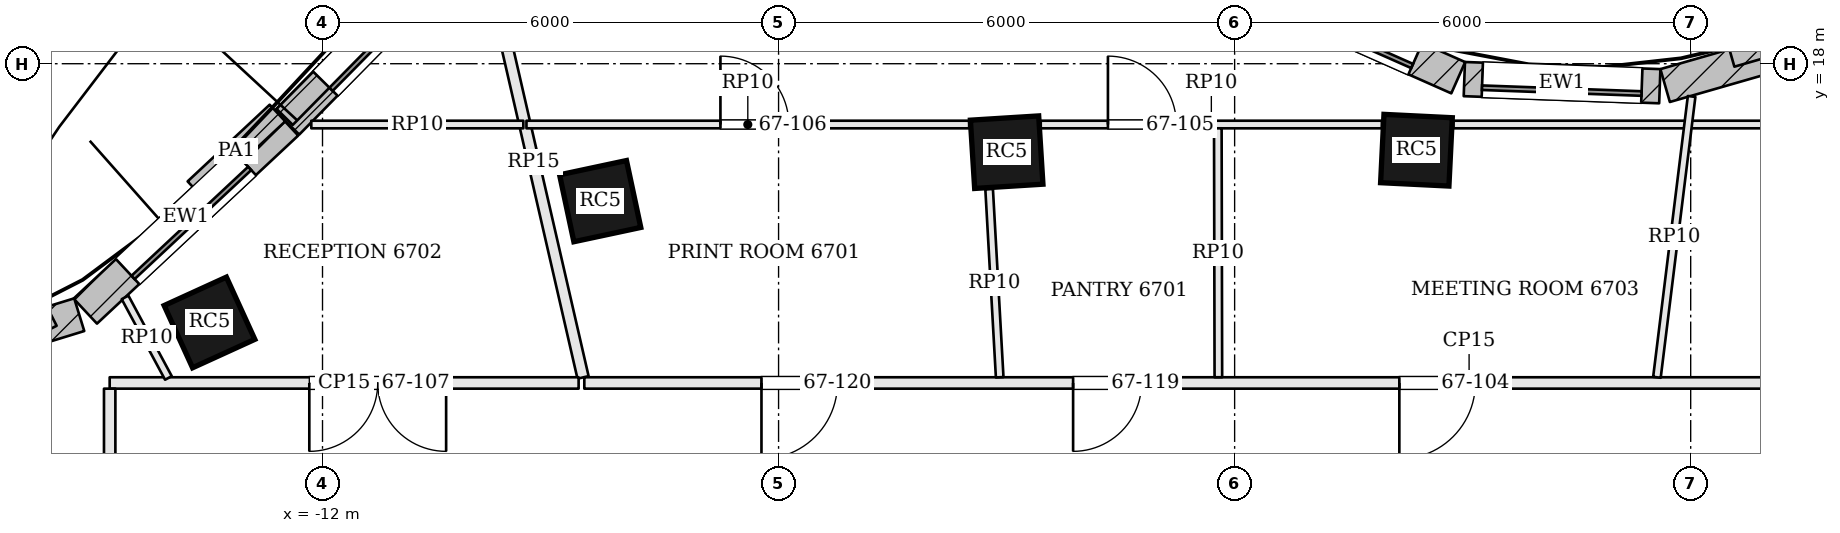
"""IFC4 building model, lengths in metres.
Left out: names, types, materials, properties, quantities, classifications, styles, units other than length and angle.
Written with IfcOpenShell. Run it as: python <this file> out.ifc"""

import sys

from ifc_helpers import new_model, si_unit, direction, frame, frame_2d, origin, origin_2d, place, context, subcontext, project, spatial, rectangle, extrude, element, fill, save


model = new_model("IFC4")
c1 = context("Model", 3, precision=1e-05, world=origin(), true_north=direction((0.0, 1.0)))
c2 = subcontext(c1, "Body", "Model", "MODEL_VIEW")
j1 = project(units=[si_unit("LENGTHUNIT", "METRE"), si_unit("PLANEANGLEUNIT", "RADIAN")], contexts=[c1])
p1 = place(None, origin())
s1 = spatial("IfcSite", under=j1, at=p1, CompositionType="ELEMENT")
p2 = place(p1, origin())
s2 = spatial("IfcBuilding", under=s1, at=p2, CompositionType="ELEMENT")
p3 = place(p2, frame((0.0, 0.0, 272.7)))
s3 = spatial("IfcBuildingStorey", under=s2, at=p3, CompositionType="ELEMENT", Elevation=272.7)
for number, where, z_axis, x_axis in (
    (1, (2.392, 16.862, 0.0), (0.0, 0.0, 1.0), (-0.999, 0.049, 0.0)),
    (2, (-2.999, 16.836, 0.0), (0.0, 0.0, 1.0), (-0.998, -0.062, 0.0)),
    (3, (-8.347, 16.192, 0.0), (0.0, 0.0, 1.0), (-0.978, -0.209, 0.0)),
    (4, (-13.487, 14.596, 0.0), (0.0, 0.0, 1.0), (-0.91, -0.415, 0.0)),
):
    element("IfcColumn", number, at=place(p3, frame(where, z_axis=z_axis, x_axis=x_axis)), inside=s3, PredefinedType="COLUMN", context=c2, shape_type="SweptSolid", body=[
        extrude(rectangle(XDim=0.9, YDim=0.9, at=origin_2d()), origin(), (0.0, 0.0, 1.0), 3.9),
    ])
p4 = place(p3, frame((10.167, 19.007, 0.0), z_axis=(0.0, 0.0, 1.0), x_axis=(-0.961104057783, -0.276186513271, 0.0)))
e5 = element("IfcWall", 5, at=p4, inside=s3, PredefinedType="SOLIDWALL", context=c2, shape_type="SweptSolid", body=[
    extrude(rectangle(XDim=4.686, YDim=0.45, at=frame_2d((2.343, 0.0))), origin(), (0.0, 0.0, 1.0), 3.7),
])
p5 = place(p4, frame((1.443, 0.0, 0.9)))
e6 = element("IfcOpeningElement", 6, at=p5, cuts=e5, PredefinedType="OPENING", context=c2, shape_type="SweptSolid", body=[
    extrude(rectangle(XDim=1.8, YDim=2.3, at=frame_2d((0.9, 1.15))), frame((0.0, 0.235, 0.0), z_axis=(0.0, -1.0, 0.0), x_axis=(1.0, 0.0, 0.0)), (0.0, 0.0, 1.0), 0.47),
])
p6 = place(p3, frame((5.594, 17.704, 0.0), z_axis=(0.0, 0.0, 1.0), x_axis=(-0.999339560591, 0.036337895349, 0.0)))
e7 = element("IfcWall", 7, at=p6, inside=s3, PredefinedType="SOLIDWALL", context=c2, shape_type="SweptSolid", body=[
    extrude(rectangle(XDim=2.573, YDim=0.45, at=frame_2d((1.287, 0.0))), origin(), (0.0, 0.0, 1.0), 3.7),
])
p7 = place(p6, frame((0.237, 0.0, 0.9)))
e8 = element("IfcOpeningElement", 8, at=p7, cuts=e7, PredefinedType="OPENING", context=c2, shape_type="SweptSolid", body=[
    extrude(rectangle(XDim=2.1, YDim=2.3, at=frame_2d((1.05, 1.15))), frame((0.0, 0.235, 0.0), z_axis=(0.0, -1.0, 0.0), x_axis=(1.0, 0.0, 0.0)), (0.0, 0.0, 1.0), 0.47),
])
p8 = place(p3, frame((2.942, 17.816, 0.0), z_axis=(0.0, 0.0, 1.0), x_axis=(-0.91414046241, 0.405397601109, 0.0)))
e9 = element("IfcWall", 9, at=p8, inside=s3, PredefinedType="SOLIDWALL", context=c2, shape_type="SweptSolid", body=[
    extrude(rectangle(XDim=3.333, YDim=0.45, at=frame_2d((1.667, 0.0))), origin(), (0.0, 0.0, 1.0), 3.7),
])
p9 = place(p8, frame((0.617, 0.0, 0.9)))
e10 = element("IfcOpeningElement", 10, at=p9, cuts=e9, PredefinedType="OPENING", context=c2, shape_type="SweptSolid", body=[
    extrude(rectangle(XDim=2.1, YDim=2.3, at=frame_2d((1.05, 1.15))), frame((0.0, 0.235, 0.0), z_axis=(0.0, -1.0, 0.0), x_axis=(1.0, 0.0, 0.0)), (0.0, 0.0, 1.0), 0.47),
])
p10 = place(p3, frame((-9.984, 19.745, 0.0), z_axis=(0.0, 0.0, 1.0), x_axis=(-0.701875966769, -0.712299183821, 0.0)))
e11 = element("IfcWall", 11, at=p10, inside=s3, PredefinedType="SOLIDWALL", context=c2, shape_type="SweptSolid", body=[
    extrude(rectangle(XDim=3.537, YDim=0.45, at=frame_2d((1.769, 0.0))), origin(), (0.0, 0.0, 1.0), 3.7),
])
p11 = place(p10, frame((0.718, 0.0, 0.9)))
e12 = element("IfcOpeningElement", 12, at=p11, cuts=e11, PredefinedType="OPENING", context=c2, shape_type="SweptSolid", body=[
    extrude(rectangle(XDim=2.1, YDim=2.3, at=frame_2d((1.05, 1.15))), frame((0.0, 0.235, 0.0), z_axis=(0.0, -1.0, 0.0), x_axis=(1.0, 0.0, 0.0)), (0.0, 0.0, 1.0), 0.47),
])
p12 = place(p3, frame((-12.473, 17.219, 0.0), z_axis=(0.0, 0.0, 1.0), x_axis=(-0.730618259172, -0.68278617397, 0.0)))
e13 = element("IfcWall", 13, at=p12, inside=s3, PredefinedType="SOLIDWALL", context=c2, shape_type="SweptSolid", body=[
    extrude(rectangle(XDim=3.624, YDim=0.45, at=frame_2d((1.812, 0.0))), origin(), (0.0, 0.0, 1.0), 3.7),
])
p13 = place(p12, frame((0.762, 0.0, 0.9)))
e14 = element("IfcOpeningElement", 14, at=p13, cuts=e13, PredefinedType="OPENING", context=c2, shape_type="SweptSolid", body=[
    extrude(rectangle(XDim=2.1, YDim=2.3, at=frame_2d((1.05, 1.15))), frame((0.0, 0.235, 0.0), z_axis=(0.0, -1.0, 0.0), x_axis=(1.0, 0.0, 0.0)), (0.0, 0.0, 1.0), 0.47),
])
p14 = place(p3, frame((-15.2, 14.698, 0.0), z_axis=(0.0, 0.0, 1.0), x_axis=(-0.955797807378, -0.294024746256, 0.0)))
e15 = element("IfcWall", 15, at=p14, inside=s3, PredefinedType="SOLIDWALL", context=c2, shape_type="SweptSolid", body=[
    extrude(rectangle(XDim=3.931, YDim=0.45, at=frame_2d((1.965, 0.0))), origin(), (0.0, 0.0, 1.0), 3.7),
])
p15 = place(p14, frame((0.915, 0.0, 0.9)))
e16 = element("IfcOpeningElement", 16, at=p15, cuts=e15, PredefinedType="OPENING", context=c2, shape_type="SweptSolid", body=[
    extrude(rectangle(XDim=2.1, YDim=2.3, at=frame_2d((1.05, 1.15))), frame((0.0, 0.235, 0.0), z_axis=(0.0, -1.0, 0.0), x_axis=(1.0, 0.0, 0.0)), (0.0, 0.0, 1.0), 0.47),
])
p16 = place(p3, frame((-15.587, 14.507, 0.0), z_axis=(0.0, 0.0, 1.0), x_axis=(-0.452117231361, 0.89195852432, 0.0)))
e17 = element("IfcWall", 17, at=p16, inside=s3, PredefinedType="SOLIDWALL", context=c2, shape_type="SweptSolid", body=[
    extrude(rectangle(XDim=1.75, YDim=0.2, at=frame_2d((0.875, 0.0))), origin(), (0.0, 0.0, 1.0), 3.7),
])
p17 = place(p3, frame((9.765, 19.034, 3.9), z_axis=(0.0, 0.0, 1.0), x_axis=(-0.961095330658, -0.276216881069, 0.0)))
e18 = element("IfcWall", 18, at=p17, inside=s3, PredefinedType="PARAPET", context=c2, shape_type="SweptSolid", body=[
    extrude(rectangle(XDim=3.362, YDim=0.3, at=frame_2d((1.681, 0.0))), origin(), (0.0, 0.0, 1.0), 1.1),
])
p18 = place(p3, frame((-10.091, 19.743, 3.9), z_axis=(0.0, 0.0, 1.0), x_axis=(-0.701890602001, -0.712284762453, 0.0)))
e19 = element("IfcWall", 19, at=p18, inside=s3, PredefinedType="PARAPET", context=c2, shape_type="SweptSolid", body=[
    extrude(rectangle(XDim=3.429, YDim=0.3, at=frame_2d((1.715, 0.0))), origin(), (0.0, 0.0, 1.0), 1.1),
])
p19 = place(p3, frame((-12.593, 17.351, 3.9), z_axis=(0.0, 0.0, 1.0), x_axis=(-0.730582493513, -0.682824443157, 0.0)))
e20 = element("IfcWall", 20, at=p19, inside=s3, PredefinedType="PARAPET", context=c2, shape_type="SweptSolid", body=[
    extrude(rectangle(XDim=1.477, YDim=0.3, at=frame_2d((0.739, 0.0))), origin(), (0.0, 0.0, 1.0), 1.1),
])
p20 = place(p3, frame((14.725, 13.8, 0.0), z_axis=(0.0, 0.0, 1.0), x_axis=(-1.0, 0.0, 0.0)))
e21 = element("IfcWall", 21, at=p20, inside=s3, PredefinedType="PARTITIONING", context=c2, shape_type="SweptSolid", body=[
    extrude(rectangle(XDim=23.281, YDim=0.15, at=frame_2d((11.64, 0.0))), origin(), (0.0, 0.0, 1.0), 3.198),
])
p21 = place(p20, frame((3.15, 0.0, 0.0)))
e22 = element("IfcOpeningElement", 22, at=p21, cuts=e21, PredefinedType="OPENING", context=c2, shape_type="SweptSolid", body=[
    extrude(rectangle(XDim=1.0, YDim=2.4, at=frame_2d((0.5, 1.2))), frame((0.0, 0.085, 0.0), z_axis=(0.0, -1.0, 0.0), x_axis=(1.0, 0.0, 0.0)), (0.0, 0.0, 1.0), 0.17),
])
p22 = place(p20, frame((5.425, 0.0, 0.0)))
e23 = element("IfcOpeningElement", 23, at=p22, cuts=e21, PredefinedType="OPENING", context=c2, shape_type="SweptSolid", body=[
    extrude(rectangle(XDim=1.0, YDim=2.4, at=frame_2d((0.5, 1.2))), frame((0.0, 0.085, 0.0), z_axis=(0.0, -1.0, 0.0), x_axis=(1.0, 0.0, 0.0)), (0.0, 0.0, 1.0), 0.17),
])
p23 = place(p20, frame((11.558, 0.0, 0.0)))
e24 = element("IfcOpeningElement", 24, at=p23, cuts=e21, PredefinedType="OPENING", context=c2, shape_type="SweptSolid", body=[
    extrude(rectangle(XDim=1.0, YDim=2.4, at=frame_2d((0.5, 1.2))), frame((0.0, 0.085, 0.0), z_axis=(0.0, -1.0, 0.0), x_axis=(1.0, 0.0, 0.0)), (0.0, 0.0, 1.0), 0.17),
])
p24 = place(p20, frame((15.95, 0.0, 0.0)))
e25 = element("IfcOpeningElement", 25, at=p24, cuts=e21, PredefinedType="OPENING", context=c2, shape_type="SweptSolid", body=[
    extrude(rectangle(XDim=0.9, YDim=2.1, at=frame_2d((0.45, 1.05))), frame((0.0, 0.085, 0.0), z_axis=(0.0, -1.0, 0.0), x_axis=(1.0, 0.0, 0.0)), (0.0, 0.0, 1.0), 0.17),
])
p25 = place(p20, frame((19.95, 0.0, 0.0)))
e26 = element("IfcOpeningElement", 26, at=p25, cuts=e21, PredefinedType="OPENING", context=c2, shape_type="SweptSolid", body=[
    extrude(rectangle(XDim=1.0, YDim=2.1, at=frame_2d((0.5, 1.05))), frame((0.0, 0.085, 0.0), z_axis=(0.0, -1.0, 0.0), x_axis=(1.0, 0.0, 0.0)), (0.0, 0.0, 1.0), 0.17),
])
p26 = place(p3, frame((-9.873, 19.531, 0.0), z_axis=(0.0, 0.0, 1.0), x_axis=(0.22405782682, -0.974575851456, 0.0)))
e27 = element("IfcWall", 27, at=p26, inside=s3, PredefinedType="PARTITIONING", context=c2, shape_type="SweptSolid", body=[
    extrude(rectangle(XDim=5.806, YDim=0.15, at=frame_2d((2.903, 0.0))), origin(), (0.0, 0.0, 1.0), 3.198),
])
p27 = place(p3, frame((-8.631, 13.8, 0.0), z_axis=(0.0, 0.0, 1.0), x_axis=(-1.0, 0.0, 0.0)))
e28 = element("IfcWall", 28, at=p27, inside=s3, PredefinedType="PARTITIONING", context=c2, shape_type="SweptSolid", body=[
    extrude(rectangle(XDim=6.169, YDim=0.15, at=frame_2d((3.085, 0.0))), origin(), (0.0, 0.0, 1.0), 3.198),
])
p28 = place(p27, frame((1.743, 0.0, 0.0)))
e29 = element("IfcOpeningElement", 29, at=p28, cuts=e28, PredefinedType="OPENING", context=c2, shape_type="SweptSolid", body=[
    extrude(rectangle(XDim=1.8, YDim=2.1, at=frame_2d((0.9, 1.05))), frame((0.0, 0.085, 0.0), z_axis=(0.0, -1.0, 0.0), x_axis=(1.0, 0.0, 0.0)), (0.0, 0.0, 1.0), 0.17),
])
p29 = place(p3, frame((-14.8, 13.725, 0.0), z_axis=(0.0, 0.0, 1.0), x_axis=(0.0, -1.0, 0.0)))
e30 = element("IfcWall", 30, at=p29, inside=s3, PredefinedType="PARTITIONING", context=c2, shape_type="SweptSolid", body=[
    extrude(rectangle(XDim=18.525, YDim=0.15, at=frame_2d((9.263, 0.0))), origin(), (0.0, 0.0, 1.0), 3.198),
])
p30 = place(p29, frame((3.171, 0.0, 0.0)))
e31 = element("IfcOpeningElement", 31, at=p30, cuts=e30, PredefinedType="OPENING", context=c2, shape_type="SweptSolid", body=[
    extrude(rectangle(XDim=1.0, YDim=2.4, at=frame_2d((0.5, 1.2))), frame((0.0, 0.085, 0.0), z_axis=(0.0, -1.0, 0.0), x_axis=(1.0, 0.0, 0.0)), (0.0, 0.0, 1.0), 0.17),
])
p31 = place(p29, frame((10.418, 0.0, 0.0)))
e32 = element("IfcOpeningElement", 32, at=p31, cuts=e30, PredefinedType="OPENING", context=c2, shape_type="SweptSolid", body=[
    extrude(rectangle(XDim=1.0, YDim=2.4, at=frame_2d((0.5, 1.2))), frame((0.0, 0.085, 0.0), z_axis=(0.0, -1.0, 0.0), x_axis=(1.0, 0.0, 0.0)), (0.0, 0.0, 1.0), 0.17),
])
p32 = place(p29, frame((15.45, 0.0, 0.0)))
e33 = element("IfcOpeningElement", 33, at=p32, cuts=e30, PredefinedType="OPENING", context=c2, shape_type="SweptSolid", body=[
    extrude(rectangle(XDim=1.0, YDim=2.1, at=frame_2d((0.5, 1.05))), frame((0.0, 0.085, 0.0), z_axis=(0.0, -1.0, 0.0), x_axis=(1.0, 0.0, 0.0)), (0.0, 0.0, 1.0), 0.17),
])
p33 = place(p3, frame((-9.317, 17.2, 0.0), z_axis=(0.0, 0.0, 1.0), x_axis=(1.0, 0.0, 0.0)))
e34 = element("IfcWall", 34, at=p33, inside=s3, PredefinedType="PARTITIONING", context=c2, shape_type="SweptSolid", body=[
    extrude(rectangle(XDim=5.824, YDim=0.1, at=frame_2d((2.912, 0.0))), origin(), (0.0, 0.0, 1.0), 3.184),
])
p34 = place(p33, frame((2.552, 0.0, 0.0)))
e35 = element("IfcOpeningElement", 35, at=p34, cuts=e34, PredefinedType="OPENING", context=c2, shape_type="SweptSolid", body=[
    extrude(rectangle(XDim=0.9, YDim=2.1, at=frame_2d((0.45, 1.05))), frame((0.0, 0.06, 0.0), z_axis=(0.0, -1.0, 0.0), x_axis=(1.0, 0.0, 0.0)), (0.0, 0.0, 1.0), 0.12),
])
p35 = place(p3, frame((-2.551, 17.2, 0.0), z_axis=(0.0, 0.0, 1.0), x_axis=(1.0, 0.0, 0.0)))
e36 = element("IfcWall", 36, at=p35, inside=s3, PredefinedType="PARTITIONING", context=c2, shape_type="SweptSolid", body=[
    extrude(rectangle(XDim=4.489, YDim=0.1, at=frame_2d((2.244, 0.0))), origin(), (0.0, 0.0, 1.0), 3.184),
])
p36 = place(p35, frame((0.884, 0.0, 0.0)))
e37 = element("IfcOpeningElement", 37, at=p36, cuts=e36, PredefinedType="OPENING", context=c2, shape_type="SweptSolid", body=[
    extrude(rectangle(XDim=0.9, YDim=2.1, at=frame_2d((0.45, 1.05))), frame((0.0, 0.06, 0.0), z_axis=(0.0, -1.0, 0.0), x_axis=(1.0, 0.0, 0.0)), (0.0, 0.0, 1.0), 0.12),
])
p37 = place(p3, frame((2.879, 17.2, 0.0), z_axis=(0.0, 0.0, 1.0), x_axis=(1.0, 0.0, 0.0)))
e38 = element("IfcWall", 38, at=p37, inside=s3, PredefinedType="PARTITIONING", context=c2, shape_type="SweptSolid", body=[
    extrude(rectangle(XDim=14.337, YDim=0.1, at=frame_2d((7.168, 0.0))), origin(), (0.0, 0.0, 1.0), 3.184),
])
p38 = place(p37, frame((6.65, 0.0, 0.0)))
e39 = element("IfcOpeningElement", 39, at=p38, cuts=e38, PredefinedType="OPENING", context=c2, shape_type="SweptSolid", body=[
    extrude(rectangle(XDim=1.0, YDim=2.4, at=frame_2d((0.5, 1.2))), frame((0.0, 0.06, 0.0), z_axis=(0.0, -1.0, 0.0), x_axis=(1.0, 0.0, 0.0)), (0.0, 0.0, 1.0), 0.12),
])
p39 = place(p3, frame((5.556, 13.875, 0.0), z_axis=(0.0, 0.0, 1.0), x_axis=(0.122573624649, 0.99245942312, 0.0)))
e40 = element("IfcWall", 40, at=p39, inside=s3, PredefinedType="PARTITIONING", context=c2, shape_type="SweptSolid", body=[
    extrude(rectangle(XDim=3.723, YDim=0.1, at=frame_2d((1.861, 0.0))), origin(), (0.0, 0.0, 1.0), 3.184),
])
p40 = place(p3, frame((-0.214, 13.875, 0.0), z_axis=(0.0, 0.0, 1.0), x_axis=(-0.002161915329, 0.999997663058, 0.0)))
e41 = element("IfcWall", 41, at=p40, inside=s3, PredefinedType="PARTITIONING", context=c2, shape_type="SweptSolid", body=[
    extrude(rectangle(XDim=3.275, YDim=0.1, at=frame_2d((1.637, 0.0))), origin(), (0.0, 0.0, 1.0), 3.184),
])
p41 = place(p3, frame((-3.091, 13.875, 0.0), z_axis=(0.0, 0.0, 1.0), x_axis=(-0.056026259288, 0.998429295579, 0.0)))
e42 = element("IfcWall", 42, at=p41, inside=s3, PredefinedType="PARTITIONING", context=c2, shape_type="SweptSolid", body=[
    extrude(rectangle(XDim=2.479, YDim=0.1, at=frame_2d((1.24, 0.0))), origin(), (0.0, 0.0, 1.0), 3.184),
])
p42 = place(p3, frame((-12.148, 17.2, 0.0), z_axis=(0.0, 0.0, 1.0), x_axis=(1.0, 0.0, 0.0)))
e43 = element("IfcWall", 43, at=p42, inside=s3, PredefinedType="PARTITIONING", context=c2, shape_type="SweptSolid", body=[
    extrude(rectangle(XDim=2.79, YDim=0.1, at=frame_2d((1.395, 0.0))), origin(), (0.0, 0.0, 1.0), 3.184),
])
p43 = place(p3, frame((-14.027, 13.866, 0.0), z_axis=(0.0, 0.0, 1.0), x_axis=(-0.473869966251, 0.880594830263, 0.0)))
e44 = element("IfcWall", 44, at=p43, inside=s3, PredefinedType="PARTITIONING", context=c2, shape_type="SweptSolid", body=[
    extrude(rectangle(XDim=1.204, YDim=0.1, at=frame_2d((0.602, 0.0))), origin(), (0.0, 0.0, 1.0), 3.184),
])
p44 = place(p7, origin())
e45 = element("IfcWindow", 45, at=p44, inside=s3, PartitioningType="SINGLE_PANEL", PredefinedType="WINDOW", context=c2, shape_type="SweptSolid", body=[
    extrude(rectangle(XDim=2.1, YDim=2.3, at=frame_2d((1.05, 1.15))), frame((0.0, 0.135, 0.0), z_axis=(0.0, -1.0, 0.0), x_axis=(1.0, 0.0, 0.0)), (0.0, 0.0, 1.0), 0.06),
])
fill(e8, e45)
p45 = place(p9, origin())
e46 = element("IfcWindow", 46, at=p45, inside=s3, PartitioningType="SINGLE_PANEL", PredefinedType="WINDOW", context=c2, shape_type="SweptSolid", body=[
    extrude(rectangle(XDim=2.1, YDim=2.3, at=frame_2d((1.05, 1.15))), frame((0.0, 0.135, 0.0), z_axis=(0.0, -1.0, 0.0), x_axis=(1.0, 0.0, 0.0)), (0.0, 0.0, 1.0), 0.06),
])
fill(e10, e46)
p46 = place(p11, origin())
e47 = element("IfcWindow", 47, at=p46, inside=s3, PartitioningType="SINGLE_PANEL", PredefinedType="WINDOW", context=c2, shape_type="SweptSolid", body=[
    extrude(rectangle(XDim=2.1, YDim=2.3, at=frame_2d((1.05, 1.15))), frame((0.0, 0.135, 0.0), z_axis=(0.0, -1.0, 0.0), x_axis=(1.0, 0.0, 0.0)), (0.0, 0.0, 1.0), 0.06),
])
fill(e12, e47)
p47 = place(p13, origin())
e48 = element("IfcWindow", 48, at=p47, inside=s3, PartitioningType="SINGLE_PANEL", PredefinedType="WINDOW", context=c2, shape_type="SweptSolid", body=[
    extrude(rectangle(XDim=2.1, YDim=2.3, at=frame_2d((1.05, 1.15))), frame((0.0, 0.135, 0.0), z_axis=(0.0, -1.0, 0.0), x_axis=(1.0, 0.0, 0.0)), (0.0, 0.0, 1.0), 0.06),
])
fill(e14, e48)
p48 = place(p23, origin())
e49 = element("IfcDoor", 49, at=p48, inside=s3, OperationType="SINGLE_SWING_RIGHT", PredefinedType="DOOR", context=c2, shape_type="SweptSolid", body=[
    extrude(rectangle(XDim=1.0, YDim=2.4, at=frame_2d((0.5, 1.2))), frame((0.0, 0.025, 0.0), z_axis=(0.0, -1.0, 0.0), x_axis=(1.0, 0.0, 0.0)), (0.0, 0.0, 1.0), 0.05),
])
fill(e24, e49)
p49 = place(p36, origin())
e50 = element("IfcDoor", 50, at=p49, inside=s3, OperationType="SINGLE_SWING_LEFT", PredefinedType="DOOR", context=c2, shape_type="SweptSolid", body=[
    extrude(rectangle(XDim=0.9, YDim=2.1, at=frame_2d((0.45, 1.05))), frame((0.0, 0.025, 0.0), z_axis=(0.0, -1.0, 0.0), x_axis=(1.0, 0.0, 0.0)), (0.0, 0.0, 1.0), 0.05),
])
fill(e37, e50)
p50 = place(p34, origin())
e51 = element("IfcDoor", 51, at=p50, inside=s3, OperationType="SINGLE_SWING_LEFT", PredefinedType="DOOR", context=c2, shape_type="SweptSolid", body=[
    extrude(rectangle(XDim=0.9, YDim=2.1, at=frame_2d((0.45, 1.05))), frame((0.0, 0.025, 0.0), z_axis=(0.0, -1.0, 0.0), x_axis=(1.0, 0.0, 0.0)), (0.0, 0.0, 1.0), 0.05),
])
fill(e35, e51)
p51 = place(p28, origin())
e52 = element("IfcDoor", 52, at=p51, inside=s3, OperationType="DOUBLE_DOOR_SINGLE_SWING", PredefinedType="DOOR", context=c2, shape_type="SweptSolid", body=[
    extrude(rectangle(XDim=1.8, YDim=2.1, at=frame_2d((0.9, 1.05))), frame((0.0, 0.025, 0.0), z_axis=(0.0, -1.0, 0.0), x_axis=(1.0, 0.0, 0.0)), (0.0, 0.0, 1.0), 0.05),
])
fill(e29, e52)
p52 = place(p24, origin())
e53 = element("IfcDoor", 53, at=p52, inside=s3, OperationType="SINGLE_SWING_RIGHT", PredefinedType="DOOR", context=c2, shape_type="SweptSolid", body=[
    extrude(rectangle(XDim=0.9, YDim=2.1, at=frame_2d((0.45, 1.05))), frame((0.0, 0.025, 0.0), z_axis=(0.0, -1.0, 0.0), x_axis=(1.0, 0.0, 0.0)), (0.0, 0.0, 1.0), 0.05),
])
fill(e25, e53)
p53 = place(p25, origin())
e54 = element("IfcDoor", 54, at=p53, inside=s3, OperationType="SINGLE_SWING_RIGHT", PredefinedType="DOOR", context=c2, shape_type="SweptSolid", body=[
    extrude(rectangle(XDim=1.0, YDim=2.1, at=frame_2d((0.5, 1.05))), frame((0.0, 0.025, 0.0), z_axis=(0.0, -1.0, 0.0), x_axis=(1.0, 0.0, 0.0)), (0.0, 0.0, 1.0), 0.05),
])
fill(e26, e54)
save(model, sys.argv[1])
